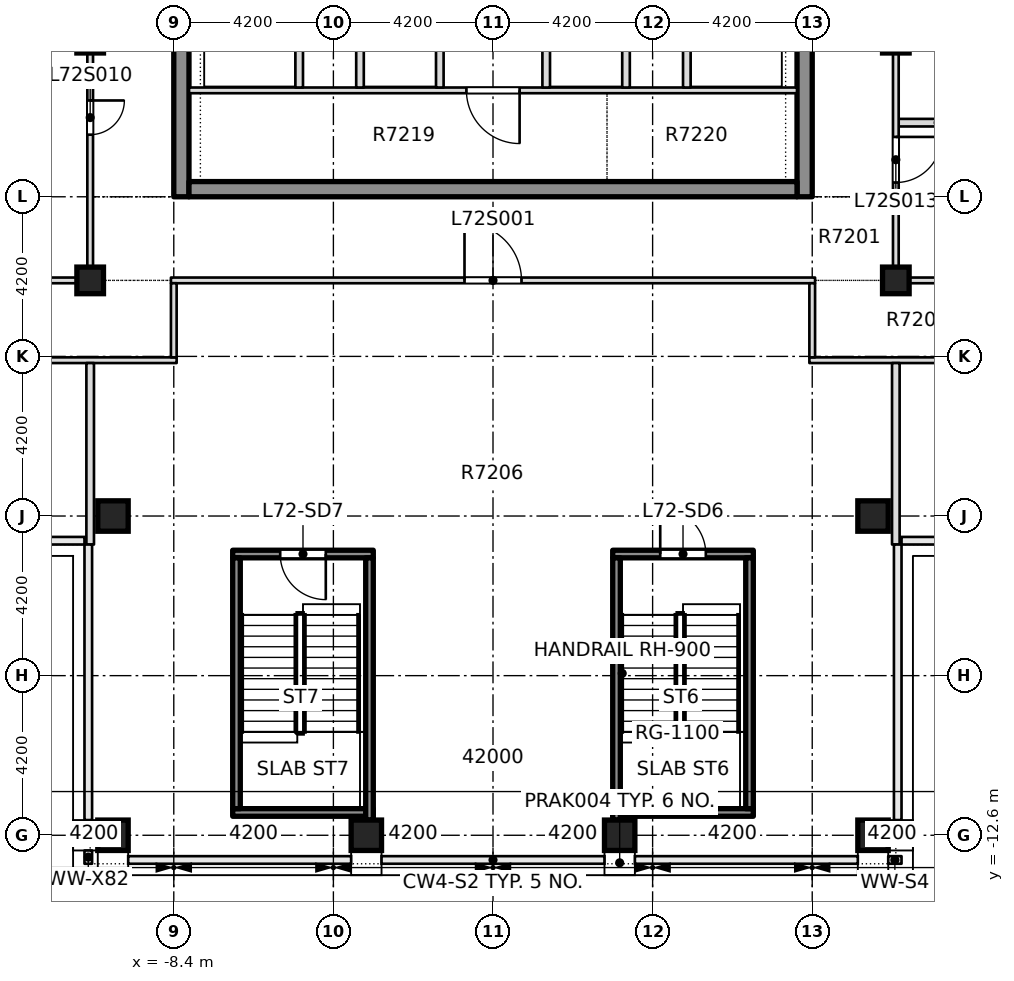
"""IFC4 building model, lengths in metres.
Left out: names, types, materials, properties, quantities, classifications, styles, units other than length and angle.
Written with IfcOpenShell. Run it as: python <this file> out.ifc"""

import sys

from ifc_helpers import new_model, si_unit, direction, frame, frame_2d, origin, origin_2d, place, context, subcontext, project, spatial, rectangle, extrude, element, fill, save


model = new_model("IFC4")
c1 = context("Model", 3, precision=1e-05, world=origin(), true_north=direction((0.0, 1.0)))
c2 = subcontext(c1, "Body", "Model", "MODEL_VIEW")
j1 = project(units=[si_unit("LENGTHUNIT", "METRE"), si_unit("PLANEANGLEUNIT", "RADIAN")], contexts=[c1])
p1 = place(None, origin())
s1 = spatial("IfcSite", under=j1, at=p1, CompositionType="ELEMENT")
p2 = place(p1, origin())
s2 = spatial("IfcBuilding", under=s1, at=p2, CompositionType="ELEMENT")
p3 = place(p2, frame((0.0, 0.0, 273.85)))
s3 = spatial("IfcBuildingStorey", under=s2, at=p3, CompositionType="ELEMENT", Elevation=273.85)
p4 = place(p3, frame((8.2, 4.2, -0.5), z_axis=(0.0, 0.0, 1.0), x_axis=(0.0, 1.0, 0.0)))
e1 = element("IfcWall", 1, at=p4, inside=s3, PredefinedType="SHEAR", context=c2, shape_type="SweptSolid", body=[
    extrude(rectangle(XDim=17.55, YDim=0.4, at=frame_2d((8.775, 0.0))), origin(), (0.0, 0.0, 1.0), 4.5),
])
p5 = place(p4, frame((6.7, 0.0, 0.5)))
e2 = element("IfcOpeningElement", 2, at=p5, cuts=e1, PredefinedType="OPENING", context=c2, shape_type="SweptSolid", body=[
    extrude(rectangle(XDim=1.2, YDim=2.1, at=frame_2d((0.6, 1.05))), frame((0.0, 0.21, 0.0), z_axis=(0.0, -1.0, 0.0), x_axis=(1.0, 0.0, 0.0)), (0.0, 0.0, 1.0), 0.42),
])
p6 = place(p3, frame((-8.2, 4.2, -0.5), z_axis=(0.0, 0.0, 1.0), x_axis=(0.0, 1.0, 0.0)))
e3 = element("IfcWall", 3, at=p6, inside=s3, PredefinedType="SHEAR", context=c2, shape_type="SweptSolid", body=[
    extrude(rectangle(XDim=17.55, YDim=0.4, at=frame_2d((8.775, 0.0))), origin(), (0.0, 0.0, 1.0), 4.5),
])
p7 = place(p6, frame((6.7, 0.0, 0.5)))
e4 = element("IfcOpeningElement", 4, at=p7, cuts=e3, PredefinedType="OPENING", context=c2, shape_type="SweptSolid", body=[
    extrude(rectangle(XDim=1.2, YDim=2.1, at=frame_2d((0.6, 1.05))), frame((0.0, 0.21, 0.0), z_axis=(0.0, -1.0, 0.0), x_axis=(1.0, 0.0, 0.0)), (0.0, 0.0, 1.0), 0.42),
])
p8 = place(p3, frame((-8.0, 4.4, -0.5), z_axis=(0.0, 0.0, 1.0), x_axis=(1.0, 0.0, 0.0)))
e5 = element("IfcWall", 5, at=p8, inside=s3, PredefinedType="SHEAR", context=c2, shape_type="SweptSolid", body=[
    extrude(rectangle(XDim=16.0, YDim=0.4, at=frame_2d((8.0, 0.0))), origin(), (0.0, 0.0, 1.0), 4.5),
])
for number, where, z_axis, x_axis in (
    (6, (-10.0, -12.6, -0.5), (0.0, 0.0, 1.0), (1.0, 0.0, 0.0)),
    (7, (-3.333, -12.6, -0.5), (0.0, 0.0, 1.0), (1.0, 0.0, 0.0)),
    (8, (3.333, -12.6, -0.5), (0.0, 0.0, 1.0), (1.0, 0.0, 0.0)),
    (9, (10.0, -12.6, -0.5), (0.0, 0.0, 1.0), (1.0, 0.0, 0.0)),
    (10, (-10.0, -4.2, -0.5), (0.0, 0.0, 1.0), (1.0, 0.0, 0.0)),
    (11, (10.0, -4.2, -0.5), (0.0, 0.0, 1.0), (1.0, 0.0, 0.0)),
):
    element("IfcColumn", number, at=place(p3, frame(where, z_axis=z_axis, x_axis=x_axis)), inside=s3, PredefinedType="COLUMN", context=c2, shape_type="SweptSolid", body=[
        extrude(rectangle(XDim=0.8, YDim=0.8, at=origin_2d()), origin(), (0.0, 0.0, 1.0), 4.5),
    ])
p9 = place(p3, frame((-10.6, 2.0, -0.5), z_axis=(0.0, 0.0, 1.0), x_axis=(1.0, 0.0, 0.0)))
e12 = element("IfcColumn", 12, at=p9, inside=s3, PredefinedType="COLUMN", context=c2, shape_type="SweptSolid", body=[
    extrude(rectangle(XDim=0.7, YDim=0.7, at=origin_2d()), origin(), (0.0, 0.0, 1.0), 4.5),
])
for number, where, z_axis, x_axis in (
    (13, (10.6, 2.0, -0.5), (0.0, 0.0, 1.0), (1.0, 0.0, 0.0)),
    (14, (-10.6, 8.333, -0.5), (0.0, 0.0, 1.0), (1.0, 0.0, 0.0)),
    (15, (10.6, 8.333, -0.5), (0.0, 0.0, 1.0), (1.0, 0.0, 0.0)),
):
    element("IfcColumn", number, at=place(p3, frame(where, z_axis=z_axis, x_axis=x_axis)), inside=s3, PredefinedType="COLUMN", context=c2, shape_type="SweptSolid", body=[
        extrude(rectangle(XDim=0.7, YDim=0.7, at=origin_2d()), origin(), (0.0, 0.0, 1.0), 5.0),
    ])
p10 = place(p3, frame((-21.55, -0.1, 0.0), z_axis=(0.0, 0.0, 1.0), x_axis=(1.0, 0.0, 0.0)))
e16 = element("IfcWall", 16, at=p10, inside=s3, PredefinedType="PARTITIONING", context=c2, shape_type="SweptSolid", body=[
    extrude(rectangle(XDim=13.225, YDim=0.15, at=frame_2d((6.613, 0.0))), origin(), (0.0, 0.0, 1.0), 4.0),
])
p11 = place(p10, frame((2.238, 0.0, 0.0)))
e17 = element("IfcOpeningElement", 17, at=p11, cuts=e16, PredefinedType="OPENING", context=c2, shape_type="SweptSolid", body=[
    extrude(rectangle(XDim=0.9, YDim=2.1, at=frame_2d((0.45, 1.05))), frame((0.0, 0.085, 0.0), z_axis=(0.0, -1.0, 0.0), x_axis=(1.0, 0.0, 0.0)), (0.0, 0.0, 1.0), 0.17),
])
p12 = place(p10, frame((7.713, 0.0, 0.0)))
e18 = element("IfcOpeningElement", 18, at=p12, cuts=e16, PredefinedType="OPENING", context=c2, shape_type="SweptSolid", body=[
    extrude(rectangle(XDim=0.9, YDim=2.1, at=frame_2d((0.45, 1.05))), frame((0.0, 0.085, 0.0), z_axis=(0.0, -1.0, 0.0), x_axis=(1.0, 0.0, 0.0)), (0.0, 0.0, 1.0), 0.17),
])
p13 = place(p3, frame((8.325, -0.1, 0.0), z_axis=(0.0, 0.0, 1.0), x_axis=(1.0, 0.0, 0.0)))
e19 = element("IfcWall", 19, at=p13, inside=s3, PredefinedType="PARTITIONING", context=c2, shape_type="SweptSolid", body=[
    extrude(rectangle(XDim=13.225, YDim=0.15, at=frame_2d((6.613, 0.0))), origin(), (0.0, 0.0, 1.0), 4.0),
])
p14 = place(p13, frame((5.225, 0.0, 0.0)))
e20 = element("IfcOpeningElement", 20, at=p14, cuts=e19, PredefinedType="OPENING", context=c2, shape_type="SweptSolid", body=[
    extrude(rectangle(XDim=1.5, YDim=2.1, at=frame_2d((0.75, 1.05))), frame((0.0, 0.085, 0.0), z_axis=(0.0, -1.0, 0.0), x_axis=(1.0, 0.0, 0.0)), (0.0, 0.0, 1.0), 0.17),
])
p15 = place(p13, frame((11.0, 0.0, 0.0)))
e21 = element("IfcOpeningElement", 21, at=p15, cuts=e19, PredefinedType="OPENING", context=c2, shape_type="SweptSolid", body=[
    extrude(rectangle(XDim=0.9, YDim=2.1, at=frame_2d((0.45, 1.05))), frame((0.0, 0.085, 0.0), z_axis=(0.0, -1.0, 0.0), x_axis=(1.0, 0.0, 0.0)), (0.0, 0.0, 1.0), 0.17),
])
p16 = place(p3, frame((-21.55, 2.0, 0.0), z_axis=(0.0, 0.0, 1.0), x_axis=(1.0, 0.0, 0.0)))
e22 = element("IfcWall", 22, at=p16, inside=s3, PredefinedType="PARTITIONING", context=c2, shape_type="SweptSolid", body=[
    extrude(rectangle(XDim=11.025, YDim=0.15, at=frame_2d((5.513, 0.0))), origin(), (0.0, 0.0, 1.0), 4.0),
])
p17 = place(p3, frame((-8.475, 2.0, 0.0), z_axis=(0.0, 0.0, 1.0), x_axis=(1.0, 0.0, 0.0)))
e23 = element("IfcWall", 23, at=p17, inside=s3, PredefinedType="PARTITIONING", context=c2, shape_type="SweptSolid", body=[
    extrude(rectangle(XDim=16.95, YDim=0.15, at=frame_2d((8.475, 0.0))), origin(), (0.0, 0.0, 1.0), 4.0),
])
p18 = place(p17, frame((7.725, 0.0, 0.0)))
e24 = element("IfcOpeningElement", 24, at=p18, cuts=e23, PredefinedType="OPENING", context=c2, shape_type="SweptSolid", body=[
    extrude(rectangle(XDim=1.5, YDim=2.1, at=frame_2d((0.75, 1.05))), frame((0.0, 0.085, 0.0), z_axis=(0.0, -1.0, 0.0), x_axis=(1.0, 0.0, 0.0)), (0.0, 0.0, 1.0), 0.17),
])
p19 = place(p3, frame((10.525, 2.0, 0.0), z_axis=(0.0, 0.0, 1.0), x_axis=(1.0, 0.0, 0.0)))
e25 = element("IfcWall", 25, at=p19, inside=s3, PredefinedType="PARTITIONING", context=c2, shape_type="SweptSolid", body=[
    extrude(rectangle(XDim=11.025, YDim=0.15, at=frame_2d((5.513, 0.0))), origin(), (0.0, 0.0, 1.0), 4.0),
])
p20 = place(p3, frame((10.675, 6.15, 0.0), z_axis=(0.0, 0.0, 1.0), x_axis=(1.0, 0.0, 0.0)))
e26 = element("IfcWall", 26, at=p20, inside=s3, PredefinedType="PARTITIONING", context=c2, shape_type="SweptSolid", body=[
    extrude(rectangle(XDim=2.075, YDim=0.2, at=frame_2d((1.038, 0.0))), origin(), (0.0, 0.0, 1.0), 4.0),
])
p21 = place(p3, frame((-10.6, -4.95, 0.0), z_axis=(0.0, 0.0, 1.0), x_axis=(0.0, 1.0, 0.0)))
e27 = element("IfcWall", 27, at=p21, inside=s3, PredefinedType="PARTITIONING", context=c2, shape_type="SweptSolid", body=[
    extrude(rectangle(XDim=4.775, YDim=0.2, at=frame_2d((2.387, 0.0))), origin(), (0.0, 0.0, 1.0), 4.0),
])
p22 = place(p3, frame((-10.6, 2.075, 0.0), z_axis=(0.0, 0.0, 1.0), x_axis=(0.0, 1.0, 0.0)))
e28 = element("IfcWall", 28, at=p22, inside=s3, PredefinedType="PARTITIONING", context=c2, shape_type="SweptSolid", body=[
    extrude(rectangle(XDim=11.275, YDim=0.15, at=frame_2d((5.638, 0.0))), origin(), (0.0, 0.0, 1.0), 4.0),
])
p23 = place(p22, frame((3.759, 0.0, 0.0)))
e29 = element("IfcOpeningElement", 29, at=p23, cuts=e28, PredefinedType="OPENING", context=c2, shape_type="SweptSolid", body=[
    extrude(rectangle(XDim=0.9, YDim=2.1, at=frame_2d((0.45, 1.05))), frame((0.0, 0.085, 0.0), z_axis=(0.0, -1.0, 0.0), x_axis=(1.0, 0.0, 0.0)), (0.0, 0.0, 1.0), 0.17),
])
p24 = place(p22, frame((7.134, 0.0, 0.0)))
e30 = element("IfcOpeningElement", 30, at=p24, cuts=e28, PredefinedType="OPENING", context=c2, shape_type="SweptSolid", body=[
    extrude(rectangle(XDim=0.9, YDim=2.1, at=frame_2d((0.45, 1.05))), frame((0.0, 0.085, 0.0), z_axis=(0.0, -1.0, 0.0), x_axis=(1.0, 0.0, 0.0)), (0.0, 0.0, 1.0), 0.17),
])
p25 = place(p22, frame((8.875, 0.0, 0.0)))
e31 = element("IfcOpeningElement", 31, at=p25, cuts=e28, PredefinedType="OPENING", context=c2, shape_type="SweptSolid", body=[
    extrude(rectangle(XDim=1.2, YDim=2.1, at=frame_2d((0.6, 1.05))), frame((0.0, 0.085, 0.0), z_axis=(0.0, -1.0, 0.0), x_axis=(1.0, 0.0, 0.0)), (0.0, 0.0, 1.0), 0.17),
])
for number, where, z_axis, x_axis in (
    (32, (-8.4, -0.025, 0.0), (0.0, 0.0, 1.0), (0.0, 1.0, 0.0)),
    (33, (8.4, -0.025, 0.0), (0.0, 0.0, 1.0), (0.0, 1.0, 0.0)),
):
    element("IfcWall", number, at=place(p3, frame(where, z_axis=z_axis, x_axis=x_axis)), inside=s3, PredefinedType="PARTITIONING", context=c2, shape_type="SweptSolid", body=[
        extrude(rectangle(XDim=1.95, YDim=0.15, at=frame_2d((0.975, 0.0))), origin(), (0.0, 0.0, 1.0), 4.0),
    ])
p26 = place(p3, frame((10.6, -4.95, 0.0), z_axis=(0.0, 0.0, 1.0), x_axis=(0.0, 1.0, 0.0)))
e34 = element("IfcWall", 34, at=p26, inside=s3, PredefinedType="PARTITIONING", context=c2, shape_type="SweptSolid", body=[
    extrude(rectangle(XDim=4.775, YDim=0.2, at=frame_2d((2.387, 0.0))), origin(), (0.0, 0.0, 1.0), 4.0),
])
p27 = place(p3, frame((10.6, 2.075, 0.0), z_axis=(0.0, 0.0, 1.0), x_axis=(0.0, 1.0, 0.0)))
e35 = element("IfcWall", 35, at=p27, inside=s3, PredefinedType="PARTITIONING", context=c2, shape_type="SweptSolid", body=[
    extrude(rectangle(XDim=11.275, YDim=0.15, at=frame_2d((5.638, 0.0))), origin(), (0.0, 0.0, 1.0), 4.0),
])
p28 = place(p27, frame((7.125, 0.0, 0.0)))
e36 = element("IfcOpeningElement", 36, at=p28, cuts=e35, PredefinedType="OPENING", context=c2, shape_type="SweptSolid", body=[
    extrude(rectangle(XDim=1.1, YDim=2.1, at=frame_2d((0.55, 1.05))), frame((0.0, 0.085, 0.0), z_axis=(0.0, -1.0, 0.0), x_axis=(1.0, 0.0, 0.0)), (0.0, 0.0, 1.0), 0.17),
])
p29 = place(p27, frame((2.5, 0.0, 0.0)))
e37 = element("IfcOpeningElement", 37, at=p29, cuts=e35, PredefinedType="OPENING", context=c2, shape_type="SweptSolid", body=[
    extrude(rectangle(XDim=1.2, YDim=2.1, at=frame_2d((0.6, 1.05))), frame((0.0, 0.085, 0.0), z_axis=(0.0, -1.0, 0.0), x_axis=(1.0, 0.0, 0.0)), (0.0, 0.0, 1.0), 0.17),
])
for number, where, z_axis, x_axis in (
    (38, (10.4, -13.25, 0.0), (0.0, 0.0, 1.0), (1.0, 0.0, 0.0)),
    (39, (-10.65, -13.0, 0.0), (0.0, 0.0, 1.0), (0.0, -1.0, 0.0)),
):
    element("IfcWall", number, at=place(p3, frame(where, z_axis=z_axis, x_axis=x_axis)), inside=s3, PredefinedType="STANDARD", context=c2, shape_type="SweptSolid", body=[
        extrude(rectangle(XDim=0.35, YDim=0.2, at=frame_2d((0.175, 0.0))), origin(), (0.0, 0.0, 1.0), 4.0),
    ])
p30 = place(p3, frame((-7.999, 7.0, 0.0), z_axis=(0.0, 0.0, 1.0), x_axis=(1.0, 0.0, 0.0)))
e40 = element("IfcWall", 40, at=p30, inside=s3, PredefinedType="PARTITIONING", context=c2, shape_type="SweptSolid", body=[
    extrude(rectangle(XDim=15.998, YDim=0.15, at=frame_2d((7.999, 0.0))), origin(), (0.0, 0.0, 1.0), 4.0),
])
p31 = place(p30, frame((7.299, 0.0, 0.0)))
e41 = element("IfcOpeningElement", 41, at=p31, cuts=e40, PredefinedType="OPENING", context=c2, shape_type="SweptSolid", body=[
    extrude(rectangle(XDim=1.4, YDim=2.1, at=frame_2d((0.7, 1.05))), frame((0.0, 0.085, 0.0), z_axis=(0.0, -1.0, 0.0), x_axis=(1.0, 0.0, 0.0)), (0.0, 0.0, 1.0), 0.17),
])
p32 = place(p3, frame((-5.1, 7.075, 0.0), z_axis=(0.0, 0.0, 1.0), x_axis=(0.0, 1.0, 0.0)))
e42 = element("IfcWall", 42, at=p32, inside=s3, PredefinedType="PARTITIONING", context=c2, shape_type="SweptSolid", body=[
    extrude(rectangle(XDim=2.725, YDim=0.2, at=frame_2d((1.363, 0.0))), origin(), (0.0, 0.0, 1.0), 4.0),
])
for number, where, z_axis, x_axis in (
    (43, (-3.5, 7.075, 0.0), (0.0, 0.0, 1.0), (0.0, 1.0, 0.0)),
    (44, (-1.4, 7.075, 0.0), (0.0, 0.0, 1.0), (0.0, 1.0, 0.0)),
    (45, (1.4, 7.075, 0.0), (0.0, 0.0, 1.0), (0.0, 1.0, 0.0)),
    (46, (3.5, 7.075, 0.0), (0.0, 0.0, 1.0), (0.0, 1.0, 0.0)),
):
    element("IfcWall", number, at=place(p3, frame(where, z_axis=z_axis, x_axis=x_axis)), inside=s3, PredefinedType="PARTITIONING", context=c2, shape_type="SweptSolid", body=[
        extrude(rectangle(XDim=2.85, YDim=0.2, at=frame_2d((1.425, 0.0))), origin(), (0.0, 0.0, 1.0), 4.0),
    ])
p33 = place(p3, frame((5.1, 7.075, 0.0), z_axis=(0.0, 0.0, 1.0), x_axis=(0.0, 1.0, 0.0)))
e47 = element("IfcWall", 47, at=p33, inside=s3, PredefinedType="PARTITIONING", context=c2, shape_type="SweptSolid", body=[
    extrude(rectangle(XDim=2.725, YDim=0.2, at=frame_2d((1.363, 0.0))), origin(), (0.0, 0.0, 1.0), 4.0),
])
p34 = place(p3, frame((3.15, -12.0, 0.0), z_axis=(0.0, 0.0, 1.0), x_axis=(1.0, 0.0, 0.0)))
e48 = element("IfcWall", 48, at=p34, inside=s3, PredefinedType="SOLIDWALL", context=c2, shape_type="SweptSolid", body=[
    extrude(rectangle(XDim=3.7, YDim=0.2, at=frame_2d((1.85, 0.0))), origin(), (0.0, 0.0, 1.0), 4.0),
])
p35 = place(p3, frame((3.15, -5.2, 0.0), z_axis=(0.0, 0.0, 1.0), x_axis=(1.0, 0.0, 0.0)))
e49 = element("IfcWall", 49, at=p35, inside=s3, PredefinedType="SOLIDWALL", context=c2, shape_type="SweptSolid", body=[
    extrude(rectangle(XDim=3.7, YDim=0.2, at=frame_2d((1.85, 0.0))), origin(), (0.0, 0.0, 1.0), 4.0),
])
p36 = place(p35, frame((1.25, 0.0, 0.0)))
e50 = element("IfcOpeningElement", 50, at=p36, cuts=e49, PredefinedType="OPENING", context=c2, shape_type="SweptSolid", body=[
    extrude(rectangle(XDim=1.2, YDim=2.1, at=frame_2d((0.6, 1.05))), frame((0.0, 0.11, 0.0), z_axis=(0.0, -1.0, 0.0), x_axis=(1.0, 0.0, 0.0)), (0.0, 0.0, 1.0), 0.22),
])
p37 = place(p3, frame((3.25, -12.2, 0.0), z_axis=(0.0, 0.0, 1.0), x_axis=(0.0, 1.0, 0.0)))
e51 = element("IfcWall", 51, at=p37, inside=s3, PredefinedType="SOLIDWALL", context=c2, shape_type="SweptSolid", body=[
    extrude(rectangle(XDim=6.9, YDim=0.2, at=frame_2d((3.45, 0.0))), origin(), (0.0, 0.0, 1.0), 4.0),
])
p38 = place(p3, frame((6.75, -11.9, 0.0), z_axis=(0.0, 0.0, 1.0), x_axis=(0.0, 1.0, 0.0)))
e52 = element("IfcWall", 52, at=p38, inside=s3, PredefinedType="SOLIDWALL", context=c2, shape_type="SweptSolid", body=[
    extrude(rectangle(XDim=6.6, YDim=0.2, at=frame_2d((3.3, 0.0))), origin(), (0.0, 0.0, 1.0), 4.0),
])
p39 = place(p3, frame((-6.85, -12.0, 0.0), z_axis=(0.0, 0.0, 1.0), x_axis=(1.0, 0.0, 0.0)))
e53 = element("IfcWall", 53, at=p39, inside=s3, PredefinedType="SOLIDWALL", context=c2, shape_type="SweptSolid", body=[
    extrude(rectangle(XDim=3.7, YDim=0.2, at=frame_2d((1.85, 0.0))), origin(), (0.0, 0.0, 1.0), 4.0),
])
p40 = place(p3, frame((-6.85, -5.2, 0.0), z_axis=(0.0, 0.0, 1.0), x_axis=(1.0, 0.0, 0.0)))
e54 = element("IfcWall", 54, at=p40, inside=s3, PredefinedType="SOLIDWALL", context=c2, shape_type="SweptSolid", body=[
    extrude(rectangle(XDim=3.7, YDim=0.2, at=frame_2d((1.85, 0.0))), origin(), (0.0, 0.0, 1.0), 4.0),
])
p41 = place(p40, frame((1.25, 0.0, 0.0)))
e55 = element("IfcOpeningElement", 55, at=p41, cuts=e54, PredefinedType="OPENING", context=c2, shape_type="SweptSolid", body=[
    extrude(rectangle(XDim=1.2, YDim=2.1, at=frame_2d((0.6, 1.05))), frame((0.0, 0.11, 0.0), z_axis=(0.0, -1.0, 0.0), x_axis=(1.0, 0.0, 0.0)), (0.0, 0.0, 1.0), 0.22),
])
p42 = place(p3, frame((-6.75, -11.9, 0.0), z_axis=(0.0, 0.0, 1.0), x_axis=(0.0, 1.0, 0.0)))
e56 = element("IfcWall", 56, at=p42, inside=s3, PredefinedType="SOLIDWALL", context=c2, shape_type="SweptSolid", body=[
    extrude(rectangle(XDim=6.6, YDim=0.2, at=frame_2d((3.3, 0.0))), origin(), (0.0, 0.0, 1.0), 4.0),
])
p43 = place(p3, frame((-3.25, -12.2, 0.0), z_axis=(0.0, 0.0, 1.0), x_axis=(0.0, 1.0, 0.0)))
e57 = element("IfcWall", 57, at=p43, inside=s3, PredefinedType="SOLIDWALL", context=c2, shape_type="SweptSolid", body=[
    extrude(rectangle(XDim=6.9, YDim=0.2, at=frame_2d((3.45, 0.0))), origin(), (0.0, 0.0, 1.0), 4.0),
])
p44 = place(p18, origin())
e58 = element("IfcDoor", 58, at=p44, inside=s3, OperationType="DOUBLE_DOOR_SINGLE_SWING", PredefinedType="DOOR", context=c2, shape_type="SweptSolid", body=[
    extrude(rectangle(XDim=1.5, YDim=2.1, at=frame_2d((0.75, 1.05))), frame((0.0, 0.025, 0.0), z_axis=(0.0, -1.0, 0.0), x_axis=(1.0, 0.0, 0.0)), (0.0, 0.0, 1.0), 0.05),
])
fill(e24, e58)
p45 = place(p23, origin())
e59 = element("IfcDoor", 59, at=p45, inside=s3, OperationType="SINGLE_SWING_LEFT", PredefinedType="DOOR", context=c2, shape_type="SweptSolid", body=[
    extrude(rectangle(XDim=0.9, YDim=2.1, at=frame_2d((0.45, 1.05))), frame((0.0, 0.025, 0.0), z_axis=(0.0, -1.0, 0.0), x_axis=(1.0, 0.0, 0.0)), (0.0, 0.0, 1.0), 0.05),
])
fill(e29, e59)
p46 = place(p29, origin())
e60 = element("IfcDoor", 60, at=p46, inside=s3, OperationType="SINGLE_SWING_LEFT", PredefinedType="DOOR", context=c2, shape_type="SweptSolid", body=[
    extrude(rectangle(XDim=1.2, YDim=2.1, at=frame_2d((0.6, 1.05))), frame((0.0, 0.025, 0.0), z_axis=(0.0, -1.0, 0.0), x_axis=(1.0, 0.0, 0.0)), (0.0, 0.0, 1.0), 0.05),
])
fill(e37, e60)
p47 = place(p31, origin())
e61 = element("IfcDoor", 61, at=p47, inside=s3, OperationType="SINGLE_SWING_RIGHT", PredefinedType="DOOR", context=c2, shape_type="SweptSolid", body=[
    extrude(rectangle(XDim=1.4, YDim=2.1, at=frame_2d((0.7, 1.05))), frame((0.0, 0.025, 0.0), z_axis=(0.0, -1.0, 0.0), x_axis=(1.0, 0.0, 0.0)), (0.0, 0.0, 1.0), 0.05),
])
fill(e41, e61)
p48 = place(p36, origin())
e62 = element("IfcDoor", 62, at=p48, inside=s3, OperationType="SINGLE_SWING_LEFT", PredefinedType="DOOR", context=c2, shape_type="SweptSolid", body=[
    extrude(rectangle(XDim=1.2, YDim=2.1, at=frame_2d((0.6, 1.05))), frame((0.0, 0.025, 0.0), z_axis=(0.0, -1.0, 0.0), x_axis=(1.0, 0.0, 0.0)), (0.0, 0.0, 1.0), 0.05),
])
fill(e50, e62)
p49 = place(p41, origin())
e63 = element("IfcDoor", 63, at=p49, inside=s3, OperationType="SINGLE_SWING_LEFT", PredefinedType="DOOR", context=c2, shape_type="SweptSolid", body=[
    extrude(rectangle(XDim=1.2, YDim=2.1, at=frame_2d((0.6, 1.05))), frame((0.0, 0.025, 0.0), z_axis=(0.0, -1.0, 0.0), x_axis=(1.0, 0.0, 0.0)), (0.0, 0.0, 1.0), 0.05),
])
fill(e55, e63)
save(model, sys.argv[1])
